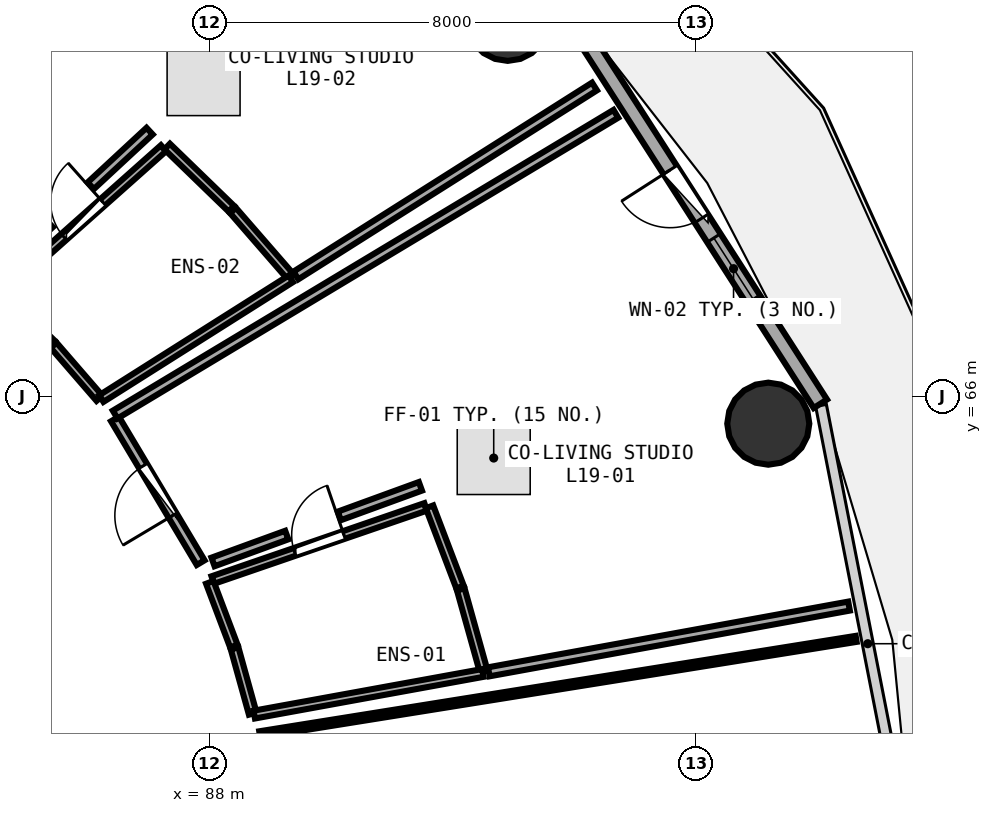
"""IFC4 building model, lengths in metres.
Left out: names, types, materials, properties, quantities, classifications, styles, units other than length and angle.
Written with IfcOpenShell. Run it as: python <this file> out.ifc"""

import sys

from ifc_helpers import new_model, si_unit, direction, frame, frame_2d, origin, origin_2d, place, context, subcontext, project, spatial, rectangle, circle, extrude, element, fill, save


model = new_model("IFC4")
c1 = context("Model", 3, precision=1e-05, world=origin(), true_north=direction((0.0, 1.0)))
c2 = subcontext(c1, "Body", "Model", "MODEL_VIEW")
j1 = project(units=[si_unit("LENGTHUNIT", "METRE"), si_unit("PLANEANGLEUNIT", "RADIAN")], contexts=[c1])
p1 = place(None, origin())
s1 = spatial("IfcSite", under=j1, at=p1, CompositionType="ELEMENT")
p2 = place(p1, origin())
s2 = spatial("IfcBuilding", under=s1, at=p2, CompositionType="ELEMENT")
p3 = place(p2, frame((0.0, 0.0, 76.35)))
s3 = spatial("IfcBuildingStorey", under=s2, at=p3, CompositionType="ELEMENT", Elevation=76.35)
for number, where, z_axis, x_axis in (
    (1, (97.192, 65.552, 0.0), (0.0, 0.0, 1.0), (1.0, 0.0, 0.0)),
    (2, (92.906, 72.193, 0.0), (0.0, 0.0, 1.0), (1.0, 0.0, 0.0)),
):
    element("IfcColumn", number, at=place(p3, frame(where, z_axis=z_axis, x_axis=x_axis)), inside=s3, PredefinedType="COLUMN", context=c2, shape_type="SweptSolid", body=[
        extrude(circle(Radius=0.675, at=origin_2d()), origin(), (0.0, 0.0, 1.0), 3.75),
    ])
p4 = place(p3, frame((98.048, 65.879, 0.0), z_axis=(0.0, 0.0, 1.0), x_axis=(-0.540620528459, 0.841266571432, 0.0)))
e3 = element("IfcWall", 3, at=p4, inside=s3, PredefinedType="SOLIDWALL", context=c2, shape_type="SweptSolid", body=[
    extrude(rectangle(XDim=8.193, YDim=0.26, at=frame_2d((4.096, 0.0))), origin(), (0.0, 0.0, 1.0), 3.475),
])
p5 = place(p4, frame((3.621, 0.0, 0.0)))
e4 = element("IfcOpeningElement", 4, at=p5, cuts=e3, PredefinedType="OPENING", context=c2, shape_type="SweptSolid", body=[
    extrude(rectangle(XDim=0.95, YDim=2.1, at=frame_2d((0.475, 1.05))), frame((0.0, 0.14, 0.0), z_axis=(0.0, -1.0, 0.0), x_axis=(1.0, 0.0, 0.0)), (0.0, 0.0, 1.0), 0.28),
])
p6 = place(p4, frame((2.041, 0.0, 0.85)))
e5 = element("IfcOpeningElement", 5, at=p6, cuts=e3, PredefinedType="OPENING", context=c2, shape_type="SweptSolid", body=[
    extrude(rectangle(XDim=1.2, YDim=1.45, at=frame_2d((0.6, 0.725))), frame((0.0, 0.14, 0.0), z_axis=(0.0, -1.0, 0.0), x_axis=(1.0, 0.0, 0.0)), (0.0, 0.0, 1.0), 0.28),
])
p7 = place(p3, frame((88.056, 62.98, 0.0), z_axis=(0.0, 0.0, 1.0), x_axis=(0.94570750663, 0.325018940838, 0.0)))
e6 = element("IfcWall", 6, at=p7, inside=s3, PredefinedType="PLUMBINGWALL", context=c2, shape_type="SweptSolid", body=[
    extrude(rectangle(XDim=3.702, YDim=0.13, at=frame_2d((1.851, 0.0))), origin(), (0.0, 0.0, 1.0), 3.175),
])
p8 = place(p7, frame((1.421, 0.0, 0.0)))
e7 = element("IfcOpeningElement", 7, at=p8, cuts=e6, PredefinedType="OPENING", context=c2, shape_type="SweptSolid", body=[
    extrude(rectangle(XDim=0.86, YDim=2.05, at=frame_2d((0.43, 1.025))), frame((0.0, 0.075, 0.0), z_axis=(0.0, -1.0, 0.0), x_axis=(1.0, 0.0, 0.0)), (0.0, 0.0, 1.0), 0.15),
])
p9 = place(p3, frame((87.856, 63.267, 0.0), z_axis=(0.0, 0.0, 1.0), x_axis=(-0.512288635556, 0.858813340535, 0.0)))
e8 = element("IfcWall", 8, at=p9, inside=s3, PredefinedType="PARTITIONING", context=c2, shape_type="SweptSolid", body=[
    extrude(rectangle(XDim=2.751, YDim=0.15, at=frame_2d((1.375, 0.0))), origin(), (0.0, 0.0, 1.0), 2.925),
])
p10 = place(p9, frame((0.901, 0.0, 0.0)))
e9 = element("IfcOpeningElement", 9, at=p10, cuts=e8, PredefinedType="OPENING", context=c2, shape_type="SweptSolid", body=[
    extrude(rectangle(XDim=0.95, YDim=2.08, at=frame_2d((0.475, 1.04))), frame((0.0, 0.085, 0.0), z_axis=(0.0, -1.0, 0.0), x_axis=(1.0, 0.0, 0.0)), (0.0, 0.0, 1.0), 0.17),
])
p11 = place(p3, frame((84.609, 67.736, 0.0), z_axis=(0.0, 0.0, 1.0), x_axis=(0.746989483068, 0.664835853565, 0.0)))
e10 = element("IfcWall", 10, at=p11, inside=s3, PredefinedType="PLUMBINGWALL", context=c2, shape_type="SweptSolid", body=[
    extrude(rectangle(XDim=3.531, YDim=0.13, at=frame_2d((1.765, 0.0))), origin(), (0.0, 0.0, 1.0), 3.175),
])
p12 = place(p11, frame((1.335, 0.0, 0.0)))
e11 = element("IfcOpeningElement", 11, at=p12, cuts=e10, PredefinedType="OPENING", context=c2, shape_type="SweptSolid", body=[
    extrude(rectangle(XDim=0.86, YDim=2.05, at=frame_2d((0.43, 1.025))), frame((0.0, 0.075, 0.0), z_axis=(0.0, -1.0, 0.0), x_axis=(1.0, 0.0, 0.0)), (0.0, 0.0, 1.0), 0.15),
])
p13 = place(p3, frame((88.713, 60.783, 0.0), z_axis=(0.0, 0.0, 1.0), x_axis=(-0.267768177699, 0.963483369349, 0.0)))
e12 = element("IfcWall", 12, at=p13, inside=s3, PredefinedType="PLUMBINGWALL", context=c2, shape_type="SweptSolid", body=[
    extrude(rectangle(XDim=1.114, YDim=0.13, at=frame_2d((0.557, 0.0))), origin(), (0.0, 0.0, 1.0), 3.48),
])
p14 = place(p3, frame((88.402, 61.895, 0.0), z_axis=(0.0, 0.0, 1.0), x_axis=(-0.353392089541, 0.935475296868, 0.0)))
e13 = element("IfcWall", 13, at=p14, inside=s3, PredefinedType="PLUMBINGWALL", context=c2, shape_type="SweptSolid", body=[
    extrude(rectangle(XDim=1.12, YDim=0.13, at=frame_2d((0.56, 0.0))), origin(), (0.0, 0.0, 1.0), 3.235),
])
p15 = place(p3, frame((91.62, 64.184, 0.0), z_axis=(0.0, 0.0, 1.0), x_axis=(0.355383981736, -0.934720399652, 0.0)))
e14 = element("IfcWall", 14, at=p15, inside=s3, PredefinedType="PLUMBINGWALL", context=c2, shape_type="SweptSolid", body=[
    extrude(rectangle(XDim=1.412, YDim=0.13, at=frame_2d((0.706, 0.0))), origin(), (0.0, 0.0, 1.0), 3.48),
])
p16 = place(p3, frame((92.135, 62.827, 0.0), z_axis=(0.0, 0.0, 1.0), x_axis=(0.268855284743, -0.963180583206, 0.0)))
e15 = element("IfcWall", 15, at=p16, inside=s3, PredefinedType="PLUMBINGWALL", context=c2, shape_type="SweptSolid", body=[
    extrude(rectangle(XDim=1.403, YDim=0.13, at=frame_2d((0.702, 0.0))), origin(), (0.0, 0.0, 1.0), 3.48),
])
p17 = place(p3, frame((92.497, 61.452, 0.0), z_axis=(0.0, 0.0, 1.0), x_axis=(-0.983811592037, -0.17920589101, 0.0)))
e16 = element("IfcWall", 16, at=p17, inside=s3, PredefinedType="PLUMBINGWALL", context=c2, shape_type="SweptSolid", body=[
    extrude(rectangle(XDim=3.821, YDim=0.13, at=frame_2d((1.911, 0.0))), origin(), (0.0, 0.0, 1.0), 3.175),
])
p18 = place(p3, frame((86.45, 65.702, 0.0), z_axis=(0.0, 0.0, 1.0), x_axis=(0.857261851198, 0.514880683731, 0.0)))
e17 = element("IfcWall", 17, at=p18, inside=s3, PredefinedType="PARTITIONING", context=c2, shape_type="SweptSolid", body=[
    extrude(rectangle(XDim=9.606, YDim=0.15, at=frame_2d((4.803, 0.0))), origin(), (0.0, 0.0, 1.0), 2.975),
])
p19 = place(p3, frame((98.52, 62.552, 0.0), z_axis=(0.0, 0.0, 1.0), x_axis=(-0.983768558102, -0.17944197973, 0.0)))
e18 = element("IfcWall", 18, at=p19, inside=s3, PredefinedType="PARTITIONING", context=c2, shape_type="SweptSolid", body=[
    extrude(rectangle(XDim=6.022, YDim=0.15, at=frame_2d((3.011, 0.0))), origin(), (0.0, 0.0, 1.0), 2.975),
])
p20 = place(p3, frame((91.47, 64.521, 0.0), z_axis=(0.0, 0.0, 1.0), x_axis=(-0.939526959999, -0.342474950084, 0.0)))
e19 = element("IfcWall", 19, at=p20, inside=s3, PredefinedType="PARTITIONING", context=c2, shape_type="SweptSolid", body=[
    extrude(rectangle(XDim=1.419, YDim=0.15, at=frame_2d((0.71, 0.0))), origin(), (0.0, 0.0, 1.0), 3.175),
])
p21 = place(p3, frame((89.272, 63.72, 0.0), z_axis=(0.0, 0.0, 1.0), x_axis=(-0.939522570491, -0.342486991779, 0.0)))
e20 = element("IfcWall", 20, at=p21, inside=s3, PredefinedType="PARTITIONING", context=c2, shape_type="SweptSolid", body=[
    extrude(rectangle(XDim=1.291, YDim=0.15, at=frame_2d((0.646, 0.0))), origin(), (0.0, 0.0, 1.0), 3.235),
])
p22 = place(p3, frame((86.193, 65.969, 0.0), z_axis=(0.0, 0.0, 1.0), x_axis=(-0.654583900851, 0.755989362853, 0.0)))
e21 = element("IfcWall", 21, at=p22, inside=s3, PredefinedType="PLUMBINGWALL", context=c2, shape_type="SweptSolid", body=[
    extrude(rectangle(XDim=1.153, YDim=0.13, at=frame_2d((0.577, 0.0))), origin(), (0.0, 0.0, 1.0), 3.48),
])
p23 = place(p3, frame((85.411, 66.87, 0.0), z_axis=(0.0, 0.0, 1.0), x_axis=(-0.715871547002, 0.698232001696, 0.0)))
e22 = element("IfcWall", 22, at=p23, inside=s3, PredefinedType="PLUMBINGWALL", context=c2, shape_type="SweptSolid", body=[
    extrude(rectangle(XDim=1.163, YDim=0.13, at=frame_2d((0.581, 0.0))), origin(), (0.0, 0.0, 1.0), 2.925),
])
p24 = place(p3, frame((87.305, 70.109, 0.0), z_axis=(0.0, 0.0, 1.0), x_axis=(0.718235032224, -0.69580057379, 0.0)))
e23 = element("IfcWall", 23, at=p24, inside=s3, PredefinedType="PLUMBINGWALL", context=c2, shape_type="SweptSolid", body=[
    extrude(rectangle(XDim=1.469, YDim=0.13, at=frame_2d((0.735, 0.0))), origin(), (0.0, 0.0, 1.0), 2.925),
])
p25 = place(p3, frame((88.388, 69.058, 0.0), z_axis=(0.0, 0.0, 1.0), x_axis=(0.656315808405, -0.754486288568, 0.0)))
e24 = element("IfcWall", 24, at=p25, inside=s3, PredefinedType="PLUMBINGWALL", context=c2, shape_type="SweptSolid", body=[
    extrude(rectangle(XDim=1.455, YDim=0.13, at=frame_2d((0.728, 0.0))), origin(), (0.0, 0.0, 1.0), 2.925),
])
p26 = place(p3, frame((89.339, 67.934, 0.0), z_axis=(0.0, 0.0, 1.0), x_axis=(-0.845293712827, -0.53430191751, 0.0)))
e25 = element("IfcWall", 25, at=p26, inside=s3, PredefinedType="PLUMBINGWALL", context=c2, shape_type="SweptSolid", body=[
    extrude(rectangle(XDim=3.687, YDim=0.13, at=frame_2d((1.843, 0.0))), origin(), (0.0, 0.0, 1.0), 3.175),
])
p27 = place(p3, frame((81.921, 69.63, 0.0), z_axis=(0.0, 0.0, 1.0), x_axis=(0.574246298275, 0.818682593511, 0.0)))
e26 = element("IfcWall", 26, at=p27, inside=s3, PredefinedType="PARTITIONING", context=c2, shape_type="SweptSolid", body=[
    extrude(rectangle(XDim=8.525, YDim=0.15, at=frame_2d((4.262, 0.0))), origin(), (0.0, 0.0, 1.0), 2.925),
])
p28 = place(p3, frame((94.333, 71.097, 0.0), z_axis=(0.0, 0.0, 1.0), x_axis=(-0.845032344767, -0.534715191759, 0.0)))
e27 = element("IfcWall", 27, at=p28, inside=s3, PredefinedType="PARTITIONING", context=c2, shape_type="SweptSolid", body=[
    extrude(rectangle(XDim=5.811, YDim=0.15, at=frame_2d((2.905, 0.0))), origin(), (0.0, 0.0, 1.0), 2.975),
])
p29 = place(p3, frame((87.017, 70.363, 0.0), z_axis=(0.0, 0.0, 1.0), x_axis=(-0.733142432265, -0.680075123801, 0.0)))
e28 = element("IfcWall", 28, at=p29, inside=s3, PredefinedType="PARTITIONING", context=c2, shape_type="SweptSolid", body=[
    extrude(rectangle(XDim=1.32, YDim=0.15, at=frame_2d((0.66, 0.0))), origin(), (0.0, 0.0, 1.0), 3.175),
])
p30 = place(p3, frame((85.374, 68.839, 0.0), z_axis=(0.0, 0.0, 1.0), x_axis=(-0.733068131904, -0.680155213159, 0.0)))
e29 = element("IfcWall", 29, at=p30, inside=s3, PredefinedType="PARTITIONING", context=c2, shape_type="SweptSolid", body=[
    extrude(rectangle(XDim=1.361, YDim=0.15, at=frame_2d((0.681, 0.0))), origin(), (0.0, 0.0, 1.0), 3.235),
])
p31 = place(p3, frame((88.827, 60.443, 0.0), z_axis=(0.0, 0.0, 1.0), x_axis=(0.987442472226, 0.157978998742, 0.0)))
e30 = element("IfcWall", 30, at=p31, inside=s3, PredefinedType="PARTITIONING", context=c2, shape_type="SweptSolid", body=[
    extrude(rectangle(XDim=9.934, YDim=0.1, at=frame_2d((4.967, 0.0))), origin(), (0.0, 0.0, 1.0), 2.975),
])
p32 = place(p5, frame((0.95, 0.0, 0.0), z_axis=(0.0, 0.0, 1.0), x_axis=(-1.0, 0.0, 0.0)))
e31 = element("IfcDoor", 31, at=p32, inside=s3, OperationType="SINGLE_SWING_LEFT", PredefinedType="DOOR", context=c2, shape_type="SweptSolid", body=[
    extrude(rectangle(XDim=0.95, YDim=2.1, at=frame_2d((0.475, 1.05))), frame((0.0, 0.025, 0.0), z_axis=(0.0, -1.0, 0.0), x_axis=(1.0, 0.0, 0.0)), (0.0, 0.0, 1.0), 0.05),
])
fill(e4, e31)
p33 = place(p6, origin())
e32 = element("IfcWindow", 32, at=p33, inside=s3, PartitioningType="SINGLE_PANEL", PredefinedType="WINDOW", context=c2, shape_type="SweptSolid", body=[
    extrude(rectangle(XDim=1.2, YDim=1.45, at=frame_2d((0.6, 0.725))), frame((0.0, 0.03, 0.0), z_axis=(0.0, -1.0, 0.0), x_axis=(1.0, 0.0, 0.0)), (0.0, 0.0, 1.0), 0.06),
])
fill(e5, e32)
p34 = place(p8, origin())
e33 = element("IfcDoor", 33, at=p34, inside=s3, OperationType="SINGLE_SWING_RIGHT", PredefinedType="DOOR", context=c2, shape_type="SweptSolid", body=[
    extrude(rectangle(XDim=0.86, YDim=2.05, at=frame_2d((0.43, 1.025))), frame((0.0, 0.025, 0.0), z_axis=(0.0, -1.0, 0.0), x_axis=(1.0, 0.0, 0.0)), (0.0, 0.0, 1.0), 0.05),
])
fill(e7, e33)
p35 = place(p10, origin())
e34 = element("IfcDoor", 34, at=p35, inside=s3, OperationType="SINGLE_SWING_LEFT", PredefinedType="DOOR", context=c2, shape_type="SweptSolid", body=[
    extrude(rectangle(XDim=0.95, YDim=2.08, at=frame_2d((0.475, 1.04))), frame((0.0, 0.025, 0.0), z_axis=(0.0, -1.0, 0.0), x_axis=(1.0, 0.0, 0.0)), (0.0, 0.0, 1.0), 0.05),
])
fill(e9, e34)
p36 = place(p12, origin())
e35 = element("IfcDoor", 35, at=p36, inside=s3, OperationType="SINGLE_SWING_RIGHT", PredefinedType="DOOR", context=c2, shape_type="SweptSolid", body=[
    extrude(rectangle(XDim=0.86, YDim=2.05, at=frame_2d((0.43, 1.025))), frame((0.0, 0.025, 0.0), z_axis=(0.0, -1.0, 0.0), x_axis=(1.0, 0.0, 0.0)), (0.0, 0.0, 1.0), 0.05),
])
fill(e11, e35)
save(model, sys.argv[1])
